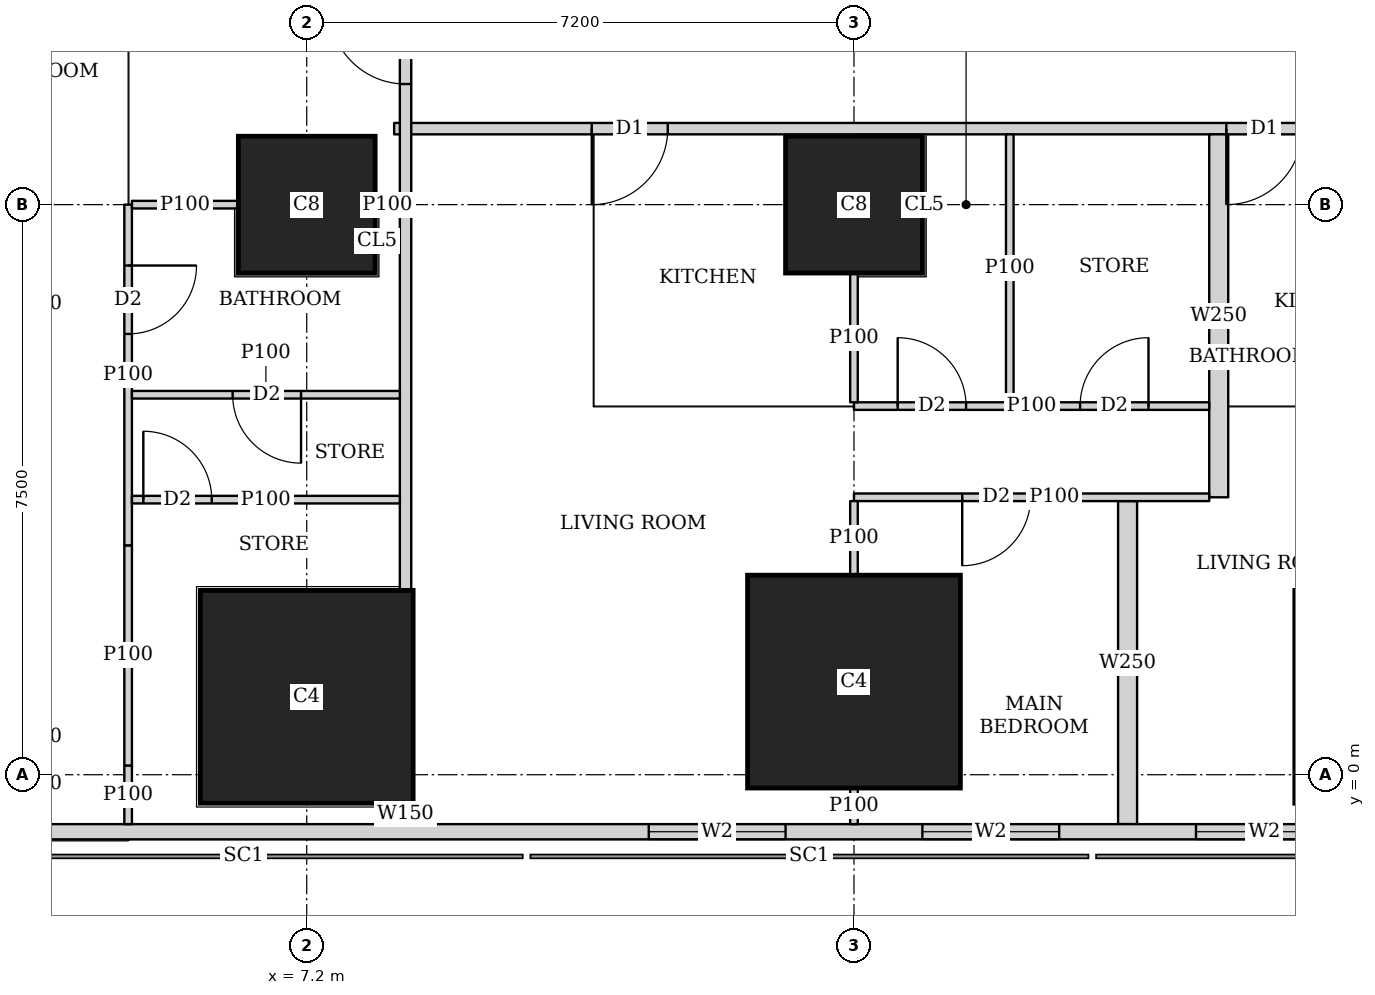
"""IFC4 building model, lengths in metres.
Left out: names, types, materials, properties, quantities, classifications, styles, units other than length and angle.
Written with IfcOpenShell. Run it as: python <this file> out.ifc"""

import sys

from ifc_helpers import new_model, si_unit, direction, frame, frame_2d, origin, origin_2d, place, context, subcontext, project, spatial, rectangle, extrude, element, fill, save


model = new_model("IFC4")
c1 = context("Model", 3, precision=1e-05, world=origin(), true_north=direction((0.0, 1.0)))
c2 = subcontext(c1, "Body", "Model", "MODEL_VIEW")
j1 = project(units=[si_unit("LENGTHUNIT", "METRE"), si_unit("PLANEANGLEUNIT", "RADIAN")], contexts=[c1])
p1 = place(None, origin())
s1 = spatial("IfcSite", under=j1, at=p1, CompositionType="ELEMENT")
p2 = place(p1, origin())
s2 = spatial("IfcBuilding", under=s1, at=p2, CompositionType="ELEMENT")
p3 = place(p2, frame((0.0, 0.0, 65.0)))
s3 = spatial("IfcBuildingStorey", under=s2, at=p3, CompositionType="ELEMENT", Elevation=65.0)
for number, where, z_axis, x_axis in (
    (1, (7.2, 1.025, 0.0), (0.0, 0.0, 1.0), (1.0, 0.0, 0.0)),
    (2, (14.4, 1.225, 0.0), (0.0, 0.0, 1.0), (1.0, 0.0, 0.0)),
):
    element("IfcColumn", number, at=place(p3, frame(where, z_axis=z_axis, x_axis=x_axis)), inside=s3, PredefinedType="COLUMN", context=c2, shape_type="SweptSolid", body=[
        extrude(rectangle(XDim=2.8, YDim=2.8, at=origin_2d()), origin(), (0.0, 0.0, 1.0), 3.75),
    ])
for number, where, z_axis, x_axis in (
    (3, (7.2, 7.5, 0.0), (0.0, 0.0, 1.0), (1.0, 0.0, 0.0)),
    (4, (14.4, 7.5, 0.0), (0.0, 0.0, 1.0), (1.0, 0.0, 0.0)),
):
    element("IfcColumn", number, at=place(p3, frame(where, z_axis=z_axis, x_axis=x_axis)), inside=s3, PredefinedType="COLUMN", context=c2, shape_type="SweptSolid", body=[
        extrude(rectangle(XDim=1.8, YDim=1.8, at=origin_2d()), origin(), (0.0, 0.0, 1.0), 3.75),
    ])
p4 = place(p3, frame((2.163, -0.75, 0.0), z_axis=(0.0, 0.0, 1.0), x_axis=(1.0, 0.0, 0.0)))
e5 = element("IfcWall", 5, at=p4, inside=s3, PredefinedType="SOLIDWALL", context=c2, shape_type="SweptSolid", body=[
    extrude(rectangle(XDim=45.628, YDim=0.2, at=frame_2d((22.814, 0.0))), origin(), (0.0, 0.0, 1.0), 3.5),
])
p5 = place(p4, frame((9.537, 0.0, 0.9)))
e6 = element("IfcOpeningElement", 6, at=p5, cuts=e5, PredefinedType="OPENING", context=c2, shape_type="SweptSolid", body=[
    extrude(rectangle(XDim=1.8, YDim=1.5, at=frame_2d((0.9, 0.75))), frame((0.0, 0.11, 0.0), z_axis=(0.0, -1.0, 0.0), x_axis=(1.0, 0.0, 0.0)), (0.0, 0.0, 1.0), 0.22),
])
p6 = place(p4, frame((13.137, 0.0, 0.9)))
e7 = element("IfcOpeningElement", 7, at=p6, cuts=e5, PredefinedType="OPENING", context=c2, shape_type="SweptSolid", body=[
    extrude(rectangle(XDim=1.8, YDim=1.5, at=frame_2d((0.9, 0.75))), frame((0.0, 0.11, 0.0), z_axis=(0.0, -1.0, 0.0), x_axis=(1.0, 0.0, 0.0)), (0.0, 0.0, 1.0), 0.22),
])
p7 = place(p4, frame((16.737, 0.0, 0.9)))
e8 = element("IfcOpeningElement", 8, at=p7, cuts=e5, PredefinedType="OPENING", context=c2, shape_type="SweptSolid", body=[
    extrude(rectangle(XDim=1.8, YDim=1.5, at=frame_2d((0.9, 0.75))), frame((0.0, 0.11, 0.0), z_axis=(0.0, -1.0, 0.0), x_axis=(1.0, 0.0, 0.0)), (0.0, 0.0, 1.0), 0.22),
])
p8 = place(p4, frame((20.337, 0.0, 0.9)))
e9 = element("IfcOpeningElement", 9, at=p8, cuts=e5, PredefinedType="OPENING", context=c2, shape_type="SweptSolid", body=[
    extrude(rectangle(XDim=1.8, YDim=1.5, at=frame_2d((0.9, 0.75))), frame((0.0, 0.11, 0.0), z_axis=(0.0, -1.0, 0.0), x_axis=(1.0, 0.0, 0.0)), (0.0, 0.0, 1.0), 0.22),
])
p9 = place(p4, frame((23.937, 0.0, 0.9)))
e10 = element("IfcOpeningElement", 10, at=p9, cuts=e5, PredefinedType="OPENING", context=c2, shape_type="SweptSolid", body=[
    extrude(rectangle(XDim=1.8, YDim=1.5, at=frame_2d((0.9, 0.75))), frame((0.0, 0.11, 0.0), z_axis=(0.0, -1.0, 0.0), x_axis=(1.0, 0.0, 0.0)), (0.0, 0.0, 1.0), 0.22),
])
p10 = place(p4, frame((27.537, 0.0, 0.9)))
e11 = element("IfcOpeningElement", 11, at=p10, cuts=e5, PredefinedType="OPENING", context=c2, shape_type="SweptSolid", body=[
    extrude(rectangle(XDim=1.8, YDim=1.5, at=frame_2d((0.9, 0.75))), frame((0.0, 0.11, 0.0), z_axis=(0.0, -1.0, 0.0), x_axis=(1.0, 0.0, 0.0)), (0.0, 0.0, 1.0), 0.22),
])
p11 = place(p4, frame((31.137, 0.0, 0.9)))
e12 = element("IfcOpeningElement", 12, at=p11, cuts=e5, PredefinedType="OPENING", context=c2, shape_type="SweptSolid", body=[
    extrude(rectangle(XDim=1.8, YDim=1.5, at=frame_2d((0.9, 0.75))), frame((0.0, 0.11, 0.0), z_axis=(0.0, -1.0, 0.0), x_axis=(1.0, 0.0, 0.0)), (0.0, 0.0, 1.0), 0.22),
])
p12 = place(p4, frame((34.737, 0.0, 0.9)))
e13 = element("IfcOpeningElement", 13, at=p12, cuts=e5, PredefinedType="OPENING", context=c2, shape_type="SweptSolid", body=[
    extrude(rectangle(XDim=1.8, YDim=1.5, at=frame_2d((0.9, 0.75))), frame((0.0, 0.11, 0.0), z_axis=(0.0, -1.0, 0.0), x_axis=(1.0, 0.0, 0.0)), (0.0, 0.0, 1.0), 0.22),
])
p13 = place(p3, frame((8.5, -0.65, 0.0), z_axis=(0.0, 0.0, 1.0), x_axis=(0.0, 1.0, 0.0)))
e14 = element("IfcWall", 14, at=p13, inside=s3, PredefinedType="SOLIDWALL", context=c2, shape_type="SweptSolid", body=[
    extrude(rectangle(XDim=0.274, YDim=0.15, at=frame_2d((0.137, 0.0))), origin(), (0.0, 0.0, 1.0), 3.5),
])
p14 = place(p3, frame((8.5, 2.426, 0.0), z_axis=(0.0, 0.0, 1.0), x_axis=(0.0, 1.0, 0.0)))
e15 = element("IfcWall", 15, at=p14, inside=s3, PredefinedType="SOLIDWALL", context=c2, shape_type="SweptSolid", body=[
    extrude(rectangle(XDim=40.173, YDim=0.15, at=frame_2d((20.086, 0.0))), origin(), (0.0, 0.0, 1.0), 3.5),
])
p15 = place(p14, frame((6.661, 0.0, 0.0)))
e16 = element("IfcOpeningElement", 16, at=p15, cuts=e15, PredefinedType="OPENING", context=c2, shape_type="SweptSolid", body=[
    extrude(rectangle(XDim=1.0, YDim=2.1, at=frame_2d((0.5, 1.05))), frame((0.0, 0.085, 0.0), z_axis=(0.0, -1.0, 0.0), x_axis=(1.0, 0.0, 0.0)), (0.0, 0.0, 1.0), 0.17),
])
p16 = place(p14, frame((9.986, 0.0, 0.0)))
e17 = element("IfcOpeningElement", 17, at=p16, cuts=e15, PredefinedType="OPENING", context=c2, shape_type="SweptSolid", body=[
    extrude(rectangle(XDim=1.0, YDim=2.1, at=frame_2d((0.5, 1.05))), frame((0.0, 0.085, 0.0), z_axis=(0.0, -1.0, 0.0), x_axis=(1.0, 0.0, 0.0)), (0.0, 0.0, 1.0), 0.17),
])
p17 = place(p14, frame((17.487, 0.0, 0.0)))
e18 = element("IfcOpeningElement", 18, at=p17, cuts=e15, PredefinedType="OPENING", context=c2, shape_type="SweptSolid", body=[
    extrude(rectangle(XDim=1.0, YDim=2.1, at=frame_2d((0.5, 1.05))), frame((0.0, 0.085, 0.0), z_axis=(0.0, -1.0, 0.0), x_axis=(1.0, 0.0, 0.0)), (0.0, 0.0, 1.0), 0.17),
])
p18 = place(p14, frame((24.987, 0.0, 0.0)))
e19 = element("IfcOpeningElement", 19, at=p18, cuts=e15, PredefinedType="OPENING", context=c2, shape_type="SweptSolid", body=[
    extrude(rectangle(XDim=1.0, YDim=2.1, at=frame_2d((0.5, 1.05))), frame((0.0, 0.085, 0.0), z_axis=(0.0, -1.0, 0.0), x_axis=(1.0, 0.0, 0.0)), (0.0, 0.0, 1.0), 0.17),
])
p19 = place(p3, frame((40.054, 8.5, 0.0), z_axis=(0.0, 0.0, 1.0), x_axis=(-1.0, 0.0, 0.0)))
e20 = element("IfcWall", 20, at=p19, inside=s3, PredefinedType="SOLIDWALL", context=c2, shape_type="SweptSolid", body=[
    extrude(rectangle(XDim=31.704, YDim=0.15, at=frame_2d((15.852, 0.0))), origin(), (0.0, 0.0, 1.0), 3.5),
])
p20 = place(p19, frame((28.104, 0.0, 0.0)))
e21 = element("IfcOpeningElement", 21, at=p20, cuts=e20, PredefinedType="OPENING", context=c2, shape_type="SweptSolid", body=[
    extrude(rectangle(XDim=1.0, YDim=2.1, at=frame_2d((0.5, 1.05))), frame((0.0, 0.085, 0.0), z_axis=(0.0, -1.0, 0.0), x_axis=(1.0, 0.0, 0.0)), (0.0, 0.0, 1.0), 0.17),
])
p21 = place(p19, frame((19.755, 0.0, 0.0)))
e22 = element("IfcOpeningElement", 22, at=p21, cuts=e20, PredefinedType="OPENING", context=c2, shape_type="SweptSolid", body=[
    extrude(rectangle(XDim=1.0, YDim=2.1, at=frame_2d((0.5, 1.05))), frame((0.0, 0.085, 0.0), z_axis=(0.0, -1.0, 0.0), x_axis=(1.0, 0.0, 0.0)), (0.0, 0.0, 1.0), 0.17),
])
p22 = place(p19, frame((12.555, 0.0, 0.0)))
e23 = element("IfcOpeningElement", 23, at=p22, cuts=e20, PredefinedType="OPENING", context=c2, shape_type="SweptSolid", body=[
    extrude(rectangle(XDim=1.0, YDim=2.1, at=frame_2d((0.5, 1.05))), frame((0.0, 0.085, 0.0), z_axis=(0.0, -1.0, 0.0), x_axis=(1.0, 0.0, 0.0)), (0.0, 0.0, 1.0), 0.17),
])
p23 = place(p19, frame((5.355, 0.0, 0.0)))
e24 = element("IfcOpeningElement", 24, at=p23, cuts=e20, PredefinedType="OPENING", context=c2, shape_type="SweptSolid", body=[
    extrude(rectangle(XDim=1.0, YDim=2.1, at=frame_2d((0.5, 1.05))), frame((0.0, 0.085, 0.0), z_axis=(0.0, -1.0, 0.0), x_axis=(1.0, 0.0, 0.0)), (0.0, 0.0, 1.0), 0.17),
])
p24 = place(p3, frame((4.85, -0.65, 0.0), z_axis=(0.0, 0.0, 1.0), x_axis=(0.0, 1.0, 0.0)))
e25 = element("IfcWall", 25, at=p24, inside=s3, PredefinedType="PARTITIONING", context=c2, shape_type="SweptSolid", body=[
    extrude(rectangle(XDim=0.771, YDim=0.1, at=frame_2d((0.385, 0.0))), origin(), (0.0, 0.0, 1.0), 3.5),
])
p25 = place(p3, frame((4.85, 0.121, 0.0), z_axis=(0.0, 0.0, 1.0), x_axis=(0.0, 1.0, 0.0)))
e26 = element("IfcWall", 26, at=p25, inside=s3, PredefinedType="PARTITIONING", context=c2, shape_type="SweptSolid", body=[
    extrude(rectangle(XDim=2.897, YDim=0.1, at=frame_2d((1.448, 0.0))), origin(), (0.0, 0.0, 1.0), 2.05),
])
p26 = place(p3, frame((4.85, 3.018, 0.0), z_axis=(0.0, 0.0, 1.0), x_axis=(0.0, 1.0, 0.0)))
e27 = element("IfcWall", 27, at=p26, inside=s3, PredefinedType="PARTITIONING", context=c2, shape_type="SweptSolid", body=[
    extrude(rectangle(XDim=4.482, YDim=0.1, at=frame_2d((2.241, 0.0))), origin(), (0.0, 0.0, 1.0), 3.5),
])
p27 = place(p26, frame((2.781, 0.0, 0.0)))
e28 = element("IfcOpeningElement", 28, at=p27, cuts=e27, PredefinedType="OPENING", context=c2, shape_type="SweptSolid", body=[
    extrude(rectangle(XDim=0.9, YDim=2.1, at=frame_2d((0.45, 1.05))), frame((0.0, 0.06, 0.0), z_axis=(0.0, -1.0, 0.0), x_axis=(1.0, 0.0, 0.0)), (0.0, 0.0, 1.0), 0.12),
])
p28 = place(p3, frame((4.9, 4.999, 0.0), z_axis=(0.0, 0.0, 1.0), x_axis=(1.0, 0.0, 0.0)))
e29 = element("IfcWall", 29, at=p28, inside=s3, PredefinedType="PARTITIONING", context=c2, shape_type="SweptSolid", body=[
    extrude(rectangle(XDim=3.525, YDim=0.1, at=frame_2d((1.763, 0.0))), origin(), (0.0, 0.0, 1.0), 3.5),
])
p29 = place(p28, frame((1.325, 0.0, 0.0)))
e30 = element("IfcOpeningElement", 30, at=p29, cuts=e29, PredefinedType="OPENING", context=c2, shape_type="SweptSolid", body=[
    extrude(rectangle(XDim=0.9, YDim=2.1, at=frame_2d((0.45, 1.05))), frame((0.0, 0.06, 0.0), z_axis=(0.0, -1.0, 0.0), x_axis=(1.0, 0.0, 0.0)), (0.0, 0.0, 1.0), 0.12),
])
p30 = place(p3, frame((4.9, 7.5, 0.0), z_axis=(0.0, 0.0, 1.0), x_axis=(1.0, 0.0, 0.0)))
e31 = element("IfcWall", 31, at=p30, inside=s3, PredefinedType="PARTITIONING", context=c2, shape_type="SweptSolid", body=[
    extrude(rectangle(XDim=1.399, YDim=0.1, at=frame_2d((0.7, 0.0))), origin(), (0.0, 0.0, 1.0), 3.5),
])
p31 = place(p3, frame((8.101, 7.5, 0.0), z_axis=(0.0, 0.0, 1.0), x_axis=(1.0, 0.0, 0.0)))
e32 = element("IfcWall", 32, at=p31, inside=s3, PredefinedType="PARTITIONING", context=c2, shape_type="SweptSolid", body=[
    extrude(rectangle(XDim=0.324, YDim=0.1, at=frame_2d((0.162, 0.0))), origin(), (0.0, 0.0, 1.0), 3.5),
])
p32 = place(p3, frame((19.074, 3.65, 0.0), z_axis=(0.0, 0.0, 1.0), x_axis=(-1.0, 0.0, 0.0)))
e33 = element("IfcWall", 33, at=p32, inside=s3, PredefinedType="PARTITIONING", context=c2, shape_type="SweptSolid", body=[
    extrude(rectangle(XDim=4.674, YDim=0.1, at=frame_2d((2.337, 0.0))), origin(), (0.0, 0.0, 1.0), 3.5),
])
p33 = place(p32, frame((2.35, 0.0, 0.0)))
e34 = element("IfcOpeningElement", 34, at=p33, cuts=e33, PredefinedType="OPENING", context=c2, shape_type="SweptSolid", body=[
    extrude(rectangle(XDim=0.9, YDim=2.1, at=frame_2d((0.45, 1.05))), frame((0.0, 0.06, 0.0), z_axis=(0.0, -1.0, 0.0), x_axis=(1.0, 0.0, 0.0)), (0.0, 0.0, 1.0), 0.12),
])
p34 = place(p3, frame((19.074, 4.85, 0.0), z_axis=(0.0, 0.0, 1.0), x_axis=(-1.0, 0.0, 0.0)))
e35 = element("IfcWall", 35, at=p34, inside=s3, PredefinedType="PARTITIONING", context=c2, shape_type="SweptSolid", body=[
    extrude(rectangle(XDim=4.674, YDim=0.1, at=frame_2d((2.337, 0.0))), origin(), (0.0, 0.0, 1.0), 3.5),
])
p35 = place(p34, frame((3.199, 0.0, 0.0)))
e36 = element("IfcOpeningElement", 36, at=p35, cuts=e35, PredefinedType="OPENING", context=c2, shape_type="SweptSolid", body=[
    extrude(rectangle(XDim=0.9, YDim=2.1, at=frame_2d((0.45, 1.05))), frame((0.0, 0.06, 0.0), z_axis=(0.0, -1.0, 0.0), x_axis=(1.0, 0.0, 0.0)), (0.0, 0.0, 1.0), 0.12),
])
p36 = place(p34, frame((0.799, 0.0, 0.0)))
e37 = element("IfcOpeningElement", 37, at=p36, cuts=e35, PredefinedType="OPENING", context=c2, shape_type="SweptSolid", body=[
    extrude(rectangle(XDim=0.9, YDim=2.1, at=frame_2d((0.45, 1.05))), frame((0.0, 0.06, 0.0), z_axis=(0.0, -1.0, 0.0), x_axis=(1.0, 0.0, 0.0)), (0.0, 0.0, 1.0), 0.12),
])
p37 = place(p3, frame((14.4, -0.65, 0.0), z_axis=(0.0, 0.0, 1.0), x_axis=(0.0, 1.0, 0.0)))
e38 = element("IfcWall", 38, at=p37, inside=s3, PredefinedType="PARTITIONING", context=c2, shape_type="SweptSolid", body=[
    extrude(rectangle(XDim=0.474, YDim=0.1, at=frame_2d((0.237, 0.0))), origin(), (0.0, 0.0, 1.0), 3.5),
])
p38 = place(p3, frame((14.4, 2.626, 0.0), z_axis=(0.0, 0.0, 1.0), x_axis=(0.0, 1.0, 0.0)))
e39 = element("IfcWall", 39, at=p38, inside=s3, PredefinedType="PARTITIONING", context=c2, shape_type="SweptSolid", body=[
    extrude(rectangle(XDim=0.974, YDim=0.1, at=frame_2d((0.487, 0.0))), origin(), (0.0, 0.0, 1.0), 3.5),
])
p39 = place(p3, frame((14.4, 4.9, 0.0), z_axis=(0.0, 0.0, 1.0), x_axis=(0.0, 1.0, 0.0)))
e40 = element("IfcWall", 40, at=p39, inside=s3, PredefinedType="PARTITIONING", context=c2, shape_type="SweptSolid", body=[
    extrude(rectangle(XDim=1.699, YDim=0.1, at=frame_2d((0.85, 0.0))), origin(), (0.0, 0.0, 1.0), 3.5),
])
p40 = place(p3, frame((16.45, 4.9, 0.0), z_axis=(0.0, 0.0, 1.0), x_axis=(0.0, 1.0, 0.0)))
e41 = element("IfcWall", 41, at=p40, inside=s3, PredefinedType="PARTITIONING", context=c2, shape_type="SweptSolid", body=[
    extrude(rectangle(XDim=3.525, YDim=0.1, at=frame_2d((1.763, 0.0))), origin(), (0.0, 0.0, 1.0), 3.5),
])
p41 = place(p3, frame((18.0, -0.65, 0.0), z_axis=(0.0, 0.0, 1.0), x_axis=(0.0, 1.0, 0.0)))
e42 = element("IfcWall", 42, at=p41, inside=s3, PredefinedType="SOLIDWALL", context=c2, shape_type="SweptSolid", body=[
    extrude(rectangle(XDim=4.25, YDim=0.25, at=frame_2d((2.125, 0.0))), origin(), (0.0, 0.0, 1.0), 2.05),
])
p42 = place(p3, frame((19.199, 3.65, 0.0), z_axis=(0.0, 0.0, 1.0), x_axis=(0.0, 1.0, 0.0)))
e43 = element("IfcWall", 43, at=p42, inside=s3, PredefinedType="SOLIDWALL", context=c2, shape_type="SweptSolid", body=[
    extrude(rectangle(XDim=4.775, YDim=0.25, at=frame_2d((2.388, 0.0))), origin(), (0.0, 0.0, 1.0), 3.5),
])
p43 = place(p3, frame((4.9, 3.619, 0.0), z_axis=(0.0, 0.0, 1.0), x_axis=(1.0, 0.0, 0.0)))
e44 = element("IfcWall", 44, at=p43, inside=s3, PredefinedType="PARTITIONING", context=c2, shape_type="SweptSolid", body=[
    extrude(rectangle(XDim=3.525, YDim=0.1, at=frame_2d((1.763, 0.0))), origin(), (0.0, 0.0, 1.0), 3.5),
])
p44 = place(p43, frame((0.15, 0.0, 0.0)))
e45 = element("IfcOpeningElement", 45, at=p44, cuts=e44, PredefinedType="OPENING", context=c2, shape_type="SweptSolid", body=[
    extrude(rectangle(XDim=0.9, YDim=2.1, at=frame_2d((0.45, 1.05))), frame((0.0, 0.06, 0.0), z_axis=(0.0, -1.0, 0.0), x_axis=(1.0, 0.0, 0.0)), (0.0, 0.0, 1.0), 0.12),
])
p45 = place(p5, origin())
e46 = element("IfcWindow", 46, at=p45, inside=s3, PartitioningType="SINGLE_PANEL", PredefinedType="WINDOW", context=c2, shape_type="SweptSolid", body=[
    extrude(rectangle(XDim=1.8, YDim=1.5, at=frame_2d((0.9, 0.75))), frame((0.0, 0.03, 0.0), z_axis=(0.0, -1.0, 0.0), x_axis=(1.0, 0.0, 0.0)), (0.0, 0.0, 1.0), 0.06),
])
fill(e6, e46)
p46 = place(p6, origin())
e47 = element("IfcWindow", 47, at=p46, inside=s3, PartitioningType="SINGLE_PANEL", PredefinedType="WINDOW", context=c2, shape_type="SweptSolid", body=[
    extrude(rectangle(XDim=1.8, YDim=1.5, at=frame_2d((0.9, 0.75))), frame((0.0, 0.03, 0.0), z_axis=(0.0, -1.0, 0.0), x_axis=(1.0, 0.0, 0.0)), (0.0, 0.0, 1.0), 0.06),
])
fill(e7, e47)
p47 = place(p7, origin())
e48 = element("IfcWindow", 48, at=p47, inside=s3, PartitioningType="SINGLE_PANEL", PredefinedType="WINDOW", context=c2, shape_type="SweptSolid", body=[
    extrude(rectangle(XDim=1.8, YDim=1.5, at=frame_2d((0.9, 0.75))), frame((0.0, 0.03, 0.0), z_axis=(0.0, -1.0, 0.0), x_axis=(1.0, 0.0, 0.0)), (0.0, 0.0, 1.0), 0.06),
])
fill(e8, e48)
p48 = place(p27, origin())
e49 = element("IfcDoor", 49, at=p48, inside=s3, OperationType="SINGLE_SWING_LEFT", PredefinedType="DOOR", context=c2, shape_type="SweptSolid", body=[
    extrude(rectangle(XDim=0.9, YDim=2.1, at=frame_2d((0.45, 1.05))), frame((0.0, 0.025, 0.0), z_axis=(0.0, -1.0, 0.0), x_axis=(1.0, 0.0, 0.0)), (0.0, 0.0, 1.0), 0.05),
])
fill(e28, e49)
p49 = place(p15, origin())
e50 = element("IfcDoor", 50, at=p49, inside=s3, OperationType="SINGLE_SWING_RIGHT", PredefinedType="DOOR", context=c2, shape_type="SweptSolid", body=[
    extrude(rectangle(XDim=1.0, YDim=2.1, at=frame_2d((0.5, 1.05))), frame((0.0, 0.025, 0.0), z_axis=(0.0, -1.0, 0.0), x_axis=(1.0, 0.0, 0.0)), (0.0, 0.0, 1.0), 0.05),
])
fill(e16, e50)
p50 = place(p33, origin())
e51 = element("IfcDoor", 51, at=p50, inside=s3, OperationType="SINGLE_SWING_RIGHT", PredefinedType="DOOR", context=c2, shape_type="SweptSolid", body=[
    extrude(rectangle(XDim=0.9, YDim=2.1, at=frame_2d((0.45, 1.05))), frame((0.0, 0.025, 0.0), z_axis=(0.0, -1.0, 0.0), x_axis=(1.0, 0.0, 0.0)), (0.0, 0.0, 1.0), 0.05),
])
fill(e34, e51)
p51 = place(p35, origin())
e52 = element("IfcDoor", 52, at=p51, inside=s3, OperationType="SINGLE_SWING_LEFT", PredefinedType="DOOR", context=c2, shape_type="SweptSolid", body=[
    extrude(rectangle(XDim=0.9, YDim=2.1, at=frame_2d((0.45, 1.05))), frame((0.0, 0.025, 0.0), z_axis=(0.0, -1.0, 0.0), x_axis=(1.0, 0.0, 0.0)), (0.0, 0.0, 1.0), 0.05),
])
fill(e36, e52)
p52 = place(p36, origin())
e53 = element("IfcDoor", 53, at=p52, inside=s3, OperationType="SINGLE_SWING_RIGHT", PredefinedType="DOOR", context=c2, shape_type="SweptSolid", body=[
    extrude(rectangle(XDim=0.9, YDim=2.1, at=frame_2d((0.45, 1.05))), frame((0.0, 0.025, 0.0), z_axis=(0.0, -1.0, 0.0), x_axis=(1.0, 0.0, 0.0)), (0.0, 0.0, 1.0), 0.05),
])
fill(e37, e53)
p53 = place(p20, origin())
e54 = element("IfcDoor", 54, at=p53, inside=s3, OperationType="SINGLE_SWING_RIGHT", PredefinedType="DOOR", context=c2, shape_type="SweptSolid", body=[
    extrude(rectangle(XDim=1.0, YDim=2.1, at=frame_2d((0.5, 1.05))), frame((0.0, 0.025, 0.0), z_axis=(0.0, -1.0, 0.0), x_axis=(1.0, 0.0, 0.0)), (0.0, 0.0, 1.0), 0.05),
])
fill(e21, e54)
p54 = place(p21, origin())
e55 = element("IfcDoor", 55, at=p54, inside=s3, OperationType="SINGLE_SWING_RIGHT", PredefinedType="DOOR", context=c2, shape_type="SweptSolid", body=[
    extrude(rectangle(XDim=1.0, YDim=2.1, at=frame_2d((0.5, 1.05))), frame((0.0, 0.025, 0.0), z_axis=(0.0, -1.0, 0.0), x_axis=(1.0, 0.0, 0.0)), (0.0, 0.0, 1.0), 0.05),
])
fill(e22, e55)
p55 = place(p29, origin())
e56 = element("IfcDoor", 56, at=p55, inside=s3, OperationType="SINGLE_SWING_LEFT", PredefinedType="DOOR", context=c2, shape_type="SweptSolid", body=[
    extrude(rectangle(XDim=0.9, YDim=2.1, at=frame_2d((0.45, 1.05))), frame((0.0, 0.025, 0.0), z_axis=(0.0, -1.0, 0.0), x_axis=(1.0, 0.0, 0.0)), (0.0, 0.0, 1.0), 0.05),
])
fill(e30, e56)
p56 = place(p44, origin())
e57 = element("IfcDoor", 57, at=p56, inside=s3, OperationType="SINGLE_SWING_LEFT", PredefinedType="DOOR", context=c2, shape_type="SweptSolid", body=[
    extrude(rectangle(XDim=0.9, YDim=2.1, at=frame_2d((0.45, 1.05))), frame((0.0, 0.025, 0.0), z_axis=(0.0, -1.0, 0.0), x_axis=(1.0, 0.0, 0.0)), (0.0, 0.0, 1.0), 0.05),
])
fill(e45, e57)
save(model, sys.argv[1])
